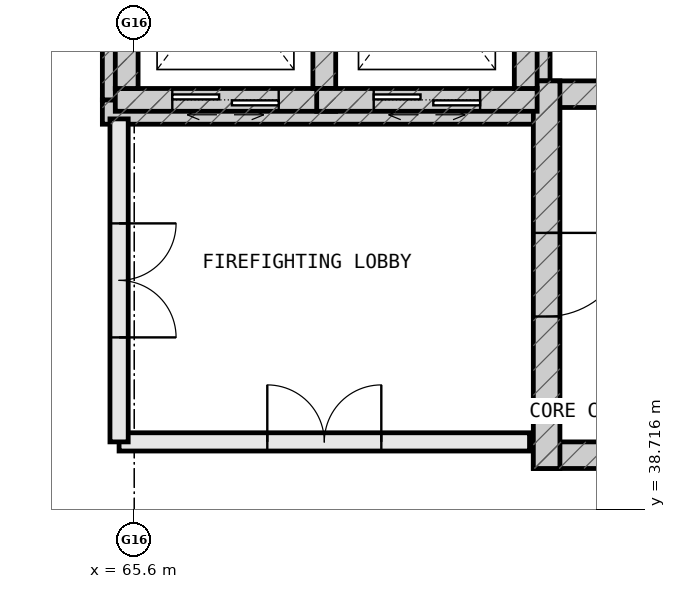
"""IFC4 building model, lengths in metres.
Left out: names, types, materials, properties, quantities, classifications, styles, units other than length and angle.
Written with IfcOpenShell. Run it as: python <this file> out.ifc"""

import sys

from ifc_helpers import new_model, si_unit, direction, frame, frame_2d, origin, place, context, subcontext, project, spatial, rectangle, extrude, element, fill, save


model = new_model("IFC4")
c1 = context("Model", 3, precision=1e-05, world=origin(), true_north=direction((0.0, 1.0)))
c2 = subcontext(c1, "Body", "Model", "MODEL_VIEW")
j1 = project(units=[si_unit("LENGTHUNIT", "METRE"), si_unit("PLANEANGLEUNIT", "RADIAN")], contexts=[c1])
p1 = place(None, origin())
s1 = spatial("IfcSite", under=j1, at=p1, CompositionType="ELEMENT")
p2 = place(p1, origin())
s2 = spatial("IfcBuilding", under=s1, at=p2, CompositionType="ELEMENT")
p3 = place(p2, frame((0.0, 0.0, -4.5)))
s3 = spatial("IfcBuildingStorey", under=s2, at=p3, CompositionType="ELEMENT", Elevation=-4.5)
p4 = place(p3, frame((65.18, 43.94, -1.18), z_axis=(0.0, 0.0, 1.0), x_axis=(1.0, 0.0, 0.0)))
e1 = element("IfcWall", 1, at=p4, inside=s3, PredefinedType="SHEAR", context=c2, shape_type="SweptSolid", body=[
    extrude(rectangle(XDim=5.89, YDim=0.32, at=frame_2d((2.945, 0.0))), origin(), (0.0, 0.0, 1.0), 1.18),
])
for number, where, z_axis, x_axis in (
    (2, (70.91, 44.1, -1.18), (0.0, 0.0, 1.0), (0.0, 1.0, 0.0)),
    (3, (65.34, 47.3, -1.18), (0.0, 0.0, 1.0), (0.0, -1.0, 0.0)),
):
    element("IfcWall", number, at=place(p3, frame(where, z_axis=z_axis, x_axis=x_axis)), inside=s3, PredefinedType="SHEAR", context=c2, shape_type="SweptSolid", body=[
        extrude(rectangle(XDim=3.2, YDim=0.32, at=frame_2d((1.6, 0.0))), origin(), (0.0, 0.0, 1.0), 1.18),
    ])
for number, where, z_axis, x_axis in (
    (4, (70.85, 39.425, 0.0), (0.0, 0.0, 1.0), (1.0, 0.0, 0.0)),
    (5, (82.95, 44.175, 0.0), (0.0, 0.0, 1.0), (-1.0, 0.0, 0.0)),
):
    element("IfcWall", number, at=place(p3, frame(where, z_axis=z_axis, x_axis=x_axis)), inside=s3, PredefinedType="SHEAR", context=c2, shape_type="SweptSolid", body=[
        extrude(rectangle(XDim=12.1, YDim=0.35, at=frame_2d((6.05, 0.0))), origin(), (0.0, 0.0, 1.0), 4.5),
    ])
p5 = place(p3, frame((71.025, 44.35, 0.0), z_axis=(0.0, 0.0, 1.0), x_axis=(0.0, -1.0, 0.0)))
e6 = element("IfcWall", 6, at=p5, inside=s3, PredefinedType="SHEAR", context=c2, shape_type="SweptSolid", body=[
    extrude(rectangle(XDim=5.1, YDim=0.35, at=frame_2d((2.55, 0.0))), origin(), (0.0, 0.0, 1.0), 4.5),
])
p6 = place(p5, frame((2.0, 0.0, 0.0)))
e7 = element("IfcOpeningElement", 7, at=p6, cuts=e6, PredefinedType="OPENING", context=c2, shape_type="SweptSolid", body=[
    extrude(rectangle(XDim=1.1, YDim=2.2, at=frame_2d((0.55, 1.1))), frame((0.0, 0.187, 0.0), z_axis=(0.0, -1.0, 0.0), x_axis=(1.0, 0.0, 0.0)), (0.0, 0.0, 1.0), 0.374),
])
p7 = place(p3, frame((65.35, 44.1, 0.0), z_axis=(0.0, 0.0, 1.0), x_axis=(1.0, 0.0, 0.0)))
e8 = element("IfcWall", 8, at=p7, inside=s3, PredefinedType="SHEAR", context=c2, shape_type="SweptSolid", body=[
    extrude(rectangle(XDim=2.9, YDim=0.3, at=frame_2d((1.45, 0.0))), origin(), (0.0, 0.0, 1.0), 4.5),
])
p8 = place(p7, frame((0.75, 0.0, 0.0)))
e9 = element("IfcOpeningElement", 9, at=p8, cuts=e8, PredefinedType="OPENING", context=c2, shape_type="SweptSolid", body=[
    extrude(rectangle(XDim=1.4, YDim=2.2, at=frame_2d((0.7, 1.1))), frame((0.0, 0.162, 0.0), z_axis=(0.0, -1.0, 0.0), x_axis=(1.0, 0.0, 0.0)), (0.0, 0.0, 1.0), 0.324),
])
for number, where, z_axis, x_axis in (
    (10, (68.1, 44.25, 0.0), (0.0, 0.0, 1.0), (0.0, 1.0, 0.0)),
    (11, (65.5, 47.15, 0.0), (0.0, 0.0, 1.0), (0.0, -1.0, 0.0)),
):
    element("IfcWall", number, at=place(p3, frame(where, z_axis=z_axis, x_axis=x_axis)), inside=s3, PredefinedType="SHEAR", context=c2, shape_type="SweptSolid", body=[
        extrude(rectangle(XDim=2.9, YDim=0.3, at=frame_2d((1.45, 0.0))), origin(), (0.0, 0.0, 1.0), 4.5),
    ])
p9 = place(p3, frame((68.0, 44.1, 0.0), z_axis=(0.0, 0.0, 1.0), x_axis=(1.0, 0.0, 0.0)))
e12 = element("IfcWall", 12, at=p9, inside=s3, PredefinedType="SHEAR", context=c2, shape_type="SweptSolid", body=[
    extrude(rectangle(XDim=2.9, YDim=0.3, at=frame_2d((1.45, 0.0))), origin(), (0.0, 0.0, 1.0), 4.5),
])
p10 = place(p9, frame((0.75, 0.0, 0.0)))
e13 = element("IfcOpeningElement", 13, at=p10, cuts=e12, PredefinedType="OPENING", context=c2, shape_type="SweptSolid", body=[
    extrude(rectangle(XDim=1.4, YDim=2.2, at=frame_2d((0.7, 1.1))), frame((0.0, 0.162, 0.0), z_axis=(0.0, -1.0, 0.0), x_axis=(1.0, 0.0, 0.0)), (0.0, 0.0, 1.0), 0.324),
])
p11 = place(p3, frame((70.75, 44.25, 0.0), z_axis=(0.0, 0.0, 1.0), x_axis=(0.0, 1.0, 0.0)))
e14 = element("IfcWall", 14, at=p11, inside=s3, PredefinedType="SHEAR", context=c2, shape_type="SweptSolid", body=[
    extrude(rectangle(XDim=2.9, YDim=0.3, at=frame_2d((1.45, 0.0))), origin(), (0.0, 0.0, 1.0), 4.5),
])
p12 = place(p3, frame((65.4, 39.6, 0.0), z_axis=(0.0, 0.0, 1.0), x_axis=(1.0, 0.0, 0.0)))
e15 = element("IfcWall", 15, at=p12, inside=s3, PredefinedType="STANDARD", context=c2, shape_type="SweptSolid", body=[
    extrude(rectangle(XDim=5.4, YDim=0.24, at=frame_2d((2.7, 0.0))), origin(), (0.0, 0.0, 1.0), 4.2),
])
p13 = place(p12, frame((1.95, 0.0, 0.0)))
e16 = element("IfcOpeningElement", 16, at=p13, cuts=e15, PredefinedType="OPENING", context=c2, shape_type="SweptSolid", body=[
    extrude(rectangle(XDim=1.5, YDim=2.2, at=frame_2d((0.75, 1.1))), frame((0.0, 0.132, 0.0), z_axis=(0.0, -1.0, 0.0), x_axis=(1.0, 0.0, 0.0)), (0.0, 0.0, 1.0), 0.264),
])
p14 = place(p3, frame((65.4, 43.85, 0.0), z_axis=(0.0, 0.0, 1.0), x_axis=(0.0, -1.0, 0.0)))
e17 = element("IfcWall", 17, at=p14, inside=s3, PredefinedType="STANDARD", context=c2, shape_type="SweptSolid", body=[
    extrude(rectangle(XDim=4.25, YDim=0.24, at=frame_2d((2.125, 0.0))), origin(), (0.0, 0.0, 1.0), 4.2),
])
p15 = place(p14, frame((1.375, 0.0, 0.0)))
e18 = element("IfcOpeningElement", 18, at=p15, cuts=e17, PredefinedType="OPENING", context=c2, shape_type="SweptSolid", body=[
    extrude(rectangle(XDim=1.5, YDim=2.2, at=frame_2d((0.75, 1.1))), frame((0.0, 0.132, 0.0), z_axis=(0.0, -1.0, 0.0), x_axis=(1.0, 0.0, 0.0)), (0.0, 0.0, 1.0), 0.264),
])
p16 = place(p6, origin())
e19 = element("IfcDoor", 19, at=p16, inside=s3, OperationType="SINGLE_SWING_LEFT", PredefinedType="DOOR", context=c2, shape_type="SweptSolid", body=[
    extrude(rectangle(XDim=1.1, YDim=2.2, at=frame_2d((0.55, 1.1))), frame((0.0, 0.025, 0.0), z_axis=(0.0, -1.0, 0.0), x_axis=(1.0, 0.0, 0.0)), (0.0, 0.0, 1.0), 0.05),
])
fill(e7, e19)
p17 = place(p8, origin())
e20 = element("IfcDoor", 20, at=p17, inside=s3, OperationType="DOUBLE_DOOR_SLIDING", PredefinedType="DOOR", context=c2, shape_type="SweptSolid", body=[
    extrude(rectangle(XDim=1.4, YDim=2.2, at=frame_2d((0.7, 1.1))), frame((0.0, 0.025, 0.0), z_axis=(0.0, -1.0, 0.0), x_axis=(1.0, 0.0, 0.0)), (0.0, 0.0, 1.0), 0.05),
])
fill(e9, e20)
p18 = place(p10, origin())
e21 = element("IfcDoor", 21, at=p18, inside=s3, OperationType="DOUBLE_DOOR_SLIDING", PredefinedType="DOOR", context=c2, shape_type="SweptSolid", body=[
    extrude(rectangle(XDim=1.4, YDim=2.2, at=frame_2d((0.7, 1.1))), frame((0.0, 0.025, 0.0), z_axis=(0.0, -1.0, 0.0), x_axis=(1.0, 0.0, 0.0)), (0.0, 0.0, 1.0), 0.05),
])
fill(e13, e21)
p19 = place(p13, origin())
e22 = element("IfcDoor", 22, at=p19, inside=s3, OperationType="DOUBLE_DOOR_SINGLE_SWING", PredefinedType="DOOR", context=c2, shape_type="SweptSolid", body=[
    extrude(rectangle(XDim=1.5, YDim=2.2, at=frame_2d((0.75, 1.1))), frame((0.0, 0.025, 0.0), z_axis=(0.0, -1.0, 0.0), x_axis=(1.0, 0.0, 0.0)), (0.0, 0.0, 1.0), 0.05),
])
fill(e16, e22)
p20 = place(p15, origin())
e23 = element("IfcDoor", 23, at=p20, inside=s3, OperationType="DOUBLE_DOOR_SINGLE_SWING", PredefinedType="DOOR", context=c2, shape_type="SweptSolid", body=[
    extrude(rectangle(XDim=1.5, YDim=2.2, at=frame_2d((0.75, 1.1))), frame((0.0, 0.025, 0.0), z_axis=(0.0, -1.0, 0.0), x_axis=(1.0, 0.0, 0.0)), (0.0, 0.0, 1.0), 0.05),
])
fill(e18, e23)
save(model, sys.argv[1])
